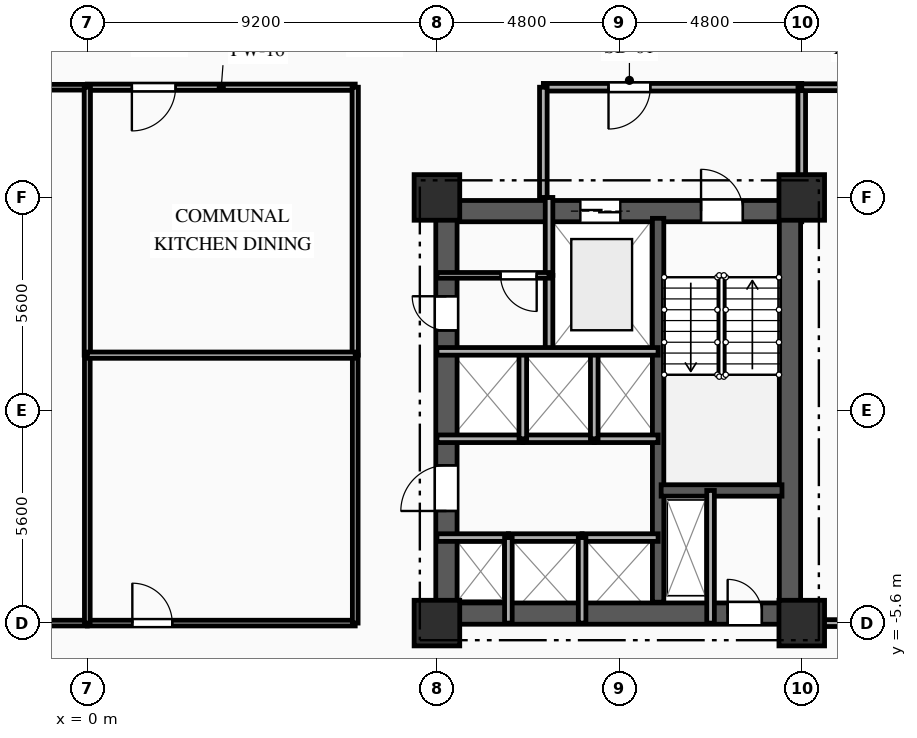
"""IFC4 building model, lengths in metres.
Left out: names, types, materials, properties, quantities, classifications, styles, units other than length and angle.
Written with IfcOpenShell. Run it as: python <this file> out.ifc"""

import sys

from ifc_helpers import new_model, si_unit, direction, frame, frame_2d, origin, origin_2d, place, context, subcontext, project, spatial, rectangle, extrude, element, fill, save


model = new_model("IFC4")
c1 = context("Model", 3, precision=1e-05, world=origin(), true_north=direction((0.0, 1.0)))
c2 = subcontext(c1, "Body", "Model", "MODEL_VIEW")
j1 = project(units=[si_unit("LENGTHUNIT", "METRE"), si_unit("PLANEANGLEUNIT", "RADIAN")], contexts=[c1])
p1 = place(None, origin())
s1 = spatial("IfcSite", under=j1, at=p1, CompositionType="ELEMENT")
p2 = place(p1, origin())
s2 = spatial("IfcBuilding", under=s1, at=p2, CompositionType="ELEMENT")
p3 = place(p2, frame((0.0, 0.0, 30.35)))
s3 = spatial("IfcBuildingStorey", under=s2, at=p3, CompositionType="ELEMENT", Elevation=30.35)
for number, where, z_axis, x_axis in (
    (1, (9.2, -5.6, 0.0), (0.0, 0.0, 1.0), (1.0, 0.0, 0.0)),
    (2, (9.2, 5.6, 0.0), (0.0, 0.0, 1.0), (1.0, 0.0, 0.0)),
    (3, (18.8, -5.6, 0.0), (0.0, 0.0, 1.0), (1.0, 0.0, 0.0)),
    (4, (18.8, 5.6, 0.0), (0.0, 0.0, 1.0), (1.0, 0.0, 0.0)),
):
    element("IfcColumn", number, at=place(p3, frame(where, z_axis=z_axis, x_axis=x_axis)), inside=s3, PredefinedType="COLUMN", context=c2, shape_type="SweptSolid", body=[
        extrude(rectangle(XDim=1.2, YDim=1.2, at=origin_2d()), origin(), (0.0, 0.0, 1.0), 3.35),
    ])
p4 = place(p3, frame((9.2, 5.24, 0.0), z_axis=(0.0, 0.0, 1.0), x_axis=(1.0, 0.0, 0.0)))
e5 = element("IfcWall", 5, at=p4, inside=s3, PredefinedType="SHEAR", context=c2, shape_type="SweptSolid", body=[
    extrude(rectangle(XDim=9.6, YDim=0.56, at=frame_2d((4.8, 0.0))), origin(), (0.0, 0.0, 1.0), 3.035),
])
p5 = place(p4, frame((6.95, 0.0, 0.0)))
e6 = element("IfcOpeningElement", 6, at=p5, cuts=e5, PredefinedType="OPENING", context=c2, shape_type="SweptSolid", body=[
    extrude(rectangle(XDim=1.1, YDim=2.15, at=frame_2d((0.55, 1.075))), frame((0.0, 0.29, 0.0), z_axis=(0.0, -1.0, 0.0), x_axis=(1.0, 0.0, 0.0)), (0.0, 0.0, 1.0), 0.58),
])
p6 = place(p4, frame((3.775, 0.0, 0.0)))
e7 = element("IfcOpeningElement", 7, at=p6, cuts=e5, PredefinedType="OPENING", context=c2, shape_type="SweptSolid", body=[
    extrude(rectangle(XDim=1.05, YDim=2.1, at=frame_2d((0.525, 1.05))), frame((0.0, 0.29, 0.0), z_axis=(0.0, -1.0, 0.0), x_axis=(1.0, 0.0, 0.0)), (0.0, 0.0, 1.0), 0.58),
])
p7 = place(p3, frame((9.2, -5.35, 0.0), z_axis=(0.0, 0.0, 1.0), x_axis=(1.0, 0.0, 0.0)))
e8 = element("IfcWall", 8, at=p7, inside=s3, PredefinedType="SHEAR", context=c2, shape_type="SweptSolid", body=[
    extrude(rectangle(XDim=9.6, YDim=0.56, at=frame_2d((4.8, 0.0))), origin(), (0.0, 0.0, 1.0), 3.035),
])
p8 = place(p7, frame((7.65, 0.0, 0.0)))
e9 = element("IfcOpeningElement", 9, at=p8, cuts=e8, PredefinedType="OPENING", context=c2, shape_type="SweptSolid", body=[
    extrude(rectangle(XDim=0.9, YDim=2.1, at=frame_2d((0.45, 1.05))), frame((0.0, 0.29, 0.0), z_axis=(0.0, -1.0, 0.0), x_axis=(1.0, 0.0, 0.0)), (0.0, 0.0, 1.0), 0.58),
])
p9 = place(p3, frame((9.45, -5.05, 0.0), z_axis=(0.0, 0.0, 1.0), x_axis=(0.0, 1.0, 0.0)))
e10 = element("IfcWall", 10, at=p9, inside=s3, PredefinedType="SHEAR", context=c2, shape_type="SweptSolid", body=[
    extrude(rectangle(XDim=10.1, YDim=0.56, at=frame_2d((5.05, 0.0))), origin(), (0.0, 0.0, 1.0), 3.035),
])
p10 = place(p9, frame((7.15, 0.0, 0.0)))
e11 = element("IfcOpeningElement", 11, at=p10, cuts=e10, PredefinedType="OPENING", context=c2, shape_type="SweptSolid", body=[
    extrude(rectangle(XDim=0.9, YDim=2.1, at=frame_2d((0.45, 1.05))), frame((0.0, 0.29, 0.0), z_axis=(0.0, -1.0, 0.0), x_axis=(1.0, 0.0, 0.0)), (0.0, 0.0, 1.0), 0.58),
])
p11 = place(p9, frame((2.4, 0.0, 0.0)))
e12 = element("IfcOpeningElement", 12, at=p11, cuts=e10, PredefinedType="OPENING", context=c2, shape_type="SweptSolid", body=[
    extrude(rectangle(XDim=1.2, YDim=2.15, at=frame_2d((0.6, 1.075))), frame((0.0, 0.29, 0.0), z_axis=(0.0, -1.0, 0.0), x_axis=(1.0, 0.0, 0.0)), (0.0, 0.0, 1.0), 0.58),
])
p12 = place(p3, frame((18.49, -5.05, 0.0), z_axis=(0.0, 0.0, 1.0), x_axis=(0.0, 1.0, 0.0)))
e13 = element("IfcWall", 13, at=p12, inside=s3, PredefinedType="SHEAR", context=c2, shape_type="SweptSolid", body=[
    extrude(rectangle(XDim=10.1, YDim=0.56, at=frame_2d((5.05, 0.0))), origin(), (0.0, 0.0, 1.0), 3.035),
])
p13 = place(p3, frame((15.02, -5.05, 0.0), z_axis=(0.0, 0.0, 1.0), x_axis=(0.0, 1.0, 0.0)))
e14 = element("IfcWall", 14, at=p13, inside=s3, PredefinedType="SHEAR", context=c2, shape_type="SweptSolid", body=[
    extrude(rectangle(XDim=10.1, YDim=0.3, at=frame_2d((5.05, 0.0))), origin(), (0.0, 0.0, 1.0), 3.035),
])
p14 = place(p3, frame((15.1, -2.11, 0.0), z_axis=(0.0, 0.0, 1.0), x_axis=(1.0, 0.0, 0.0)))
e15 = element("IfcWall", 15, at=p14, inside=s3, PredefinedType="SHEAR", context=c2, shape_type="SweptSolid", body=[
    extrude(rectangle(XDim=3.18, YDim=0.3, at=frame_2d((1.59, 0.0))), origin(), (0.0, 0.0, 1.0), 3.035),
])
p15 = place(p3, frame((16.4, -2.11, 0.0), z_axis=(0.0, 0.0, 1.0), x_axis=(0.0, -1.0, 0.0)))
e16 = element("IfcWall", 16, at=p15, inside=s3, PredefinedType="PARTITIONING", context=c2, shape_type="SweptSolid", body=[
    extrude(rectangle(XDim=3.49, YDim=0.2, at=frame_2d((1.745, 0.0))), origin(), (0.0, 0.0, 1.0), 3.035),
])
p16 = place(p3, frame((12.15, 3.55, 0.0), z_axis=(0.0, 0.0, 1.0), x_axis=(0.0, -1.0, 0.0)))
e17 = element("IfcWall", 17, at=p16, inside=s3, PredefinedType="PARTITIONING", context=c2, shape_type="SweptSolid", body=[
    extrude(rectangle(XDim=2.0, YDim=0.2, at=frame_2d((1.0, 0.0))), origin(), (0.0, 0.0, 1.0), 3.035),
])
p17 = place(p3, frame((12.15, 5.6, 0.0), z_axis=(0.0, 0.0, 1.0), x_axis=(0.0, -1.0, 0.0)))
e18 = element("IfcWall", 18, at=p17, inside=s3, PredefinedType="PARTITIONING", context=c2, shape_type="SweptSolid", body=[
    extrude(rectangle(XDim=2.05, YDim=0.2, at=frame_2d((1.025, 0.0))), origin(), (0.0, 0.0, 1.0), 3.035),
])
p18 = place(p3, frame((18.8, 8.5, 0.0), z_axis=(0.0, 0.0, 1.0), x_axis=(-1.0, 0.0, 0.0)))
e19 = element("IfcWall", 19, at=p18, inside=s3, PredefinedType="PARTITIONING", context=c2, shape_type="SweptSolid", body=[
    extrude(rectangle(XDim=6.8, YDim=0.2, at=frame_2d((3.4, 0.0))), origin(), (0.0, 0.0, 1.0), 3.035),
])
p19 = place(p18, frame((3.985, 0.0, 0.0)))
e20 = element("IfcOpeningElement", 20, at=p19, cuts=e19, PredefinedType="OPENING", context=c2, shape_type="SweptSolid", body=[
    extrude(rectangle(XDim=1.1, YDim=2.15, at=frame_2d((0.55, 1.075))), frame((0.0, 0.11, 0.0), z_axis=(0.0, -1.0, 0.0), x_axis=(1.0, 0.0, 0.0)), (0.0, 0.0, 1.0), 0.22),
])
p20 = place(p3, frame((12.0, 8.5, 0.0), z_axis=(0.0, 0.0, 1.0), x_axis=(0.0, -1.0, 0.0)))
e21 = element("IfcWall", 21, at=p20, inside=s3, PredefinedType="PARTITIONING", context=c2, shape_type="SweptSolid", body=[
    extrude(rectangle(XDim=2.9, YDim=0.2, at=frame_2d((1.45, 0.0))), origin(), (0.0, 0.0, 1.0), 3.035),
])
p21 = place(p3, frame((18.8, 5.6, 0.0), z_axis=(0.0, 0.0, 1.0), x_axis=(0.0, 1.0, 0.0)))
e22 = element("IfcWall", 22, at=p21, inside=s3, PredefinedType="PARTITIONING", context=c2, shape_type="SweptSolid", body=[
    extrude(rectangle(XDim=2.9, YDim=0.2, at=frame_2d((1.45, 0.0))), origin(), (0.0, 0.0, 1.0), 2.52),
])
p22 = place(p3, frame((12.15, 3.55, 0.0), z_axis=(0.0, 0.0, 1.0), x_axis=(-1.0, 0.0, 0.0)))
e23 = element("IfcWall", 23, at=p22, inside=s3, PredefinedType="PARTITIONING", context=c2, shape_type="SweptSolid", body=[
    extrude(rectangle(XDim=2.95, YDim=0.15, at=frame_2d((1.475, 0.0))), origin(), (0.0, 0.0, 1.0), 3.035),
])
p23 = place(p22, frame((0.325, 0.0, 0.0)))
e24 = element("IfcOpeningElement", 24, at=p23, cuts=e23, PredefinedType="OPENING", context=c2, shape_type="SweptSolid", body=[
    extrude(rectangle(XDim=0.95, YDim=2.1, at=frame_2d((0.475, 1.05))), frame((0.0, 0.085, 0.0), z_axis=(0.0, -1.0, 0.0), x_axis=(1.0, 0.0, 0.0)), (0.0, 0.0, 1.0), 0.17),
])
p24 = place(p3, frame((9.2, -3.35, 0.0), z_axis=(0.0, 0.0, 1.0), x_axis=(1.0, 0.0, 0.0)))
e25 = element("IfcWall", 25, at=p24, inside=s3, PredefinedType="PARTITIONING", context=c2, shape_type="SweptSolid", body=[
    extrude(rectangle(XDim=1.88, YDim=0.2, at=frame_2d((0.94, 0.0))), origin(), (0.0, 0.0, 1.0), 2.75),
])
p25 = place(p3, frame((11.08, -3.35, 0.0), z_axis=(0.0, 0.0, 1.0), x_axis=(1.0, 0.0, 0.0)))
e26 = element("IfcWall", 26, at=p25, inside=s3, PredefinedType="PARTITIONING", context=c2, shape_type="SweptSolid", body=[
    extrude(rectangle(XDim=1.94, YDim=0.2, at=frame_2d((0.97, 0.0))), origin(), (0.0, 0.0, 1.0), 3.035),
])
p26 = place(p3, frame((13.02, -3.35, 0.0), z_axis=(0.0, 0.0, 1.0), x_axis=(1.0, 0.0, 0.0)))
e27 = element("IfcWall", 27, at=p26, inside=s3, PredefinedType="PARTITIONING", context=c2, shape_type="SweptSolid", body=[
    extrude(rectangle(XDim=2.0, YDim=0.2, at=frame_2d((1.0, 0.0))), origin(), (0.0, 0.0, 1.0), 3.035),
])
p27 = place(p3, frame((11.46, -0.75, 0.0), z_axis=(0.0, 0.0, 1.0), x_axis=(-1.0, 0.0, 0.0)))
e28 = element("IfcWall", 28, at=p27, inside=s3, PredefinedType="PARTITIONING", context=c2, shape_type="SweptSolid", body=[
    extrude(rectangle(XDim=2.26, YDim=0.2, at=frame_2d((1.13, 0.0))), origin(), (0.0, 0.0, 1.0), 3.035),
])
p28 = place(p3, frame((13.34, -0.75, 0.0), z_axis=(0.0, 0.0, 1.0), x_axis=(-1.0, 0.0, 0.0)))
e29 = element("IfcWall", 29, at=p28, inside=s3, PredefinedType="PARTITIONING", context=c2, shape_type="SweptSolid", body=[
    extrude(rectangle(XDim=1.88, YDim=0.2, at=frame_2d((0.94, 0.0))), origin(), (0.0, 0.0, 1.0), 3.035),
])
p29 = place(p3, frame((15.02, -0.75, 0.0), z_axis=(0.0, 0.0, 1.0), x_axis=(-1.0, 0.0, 0.0)))
e30 = element("IfcWall", 30, at=p29, inside=s3, PredefinedType="PARTITIONING", context=c2, shape_type="SweptSolid", body=[
    extrude(rectangle(XDim=1.68, YDim=0.2, at=frame_2d((0.84, 0.0))), origin(), (0.0, 0.0, 1.0), 3.035),
])
for number, where, z_axis, x_axis in (
    (31, (11.08, -5.6, 0.0), (0.0, 0.0, 1.0), (0.0, 1.0, 0.0)),
    (32, (13.02, -5.6, 0.0), (0.0, 0.0, 1.0), (0.0, 1.0, 0.0)),
):
    element("IfcWall", number, at=place(p3, frame(where, z_axis=z_axis, x_axis=x_axis)), inside=s3, PredefinedType="PARTITIONING", context=c2, shape_type="SweptSolid", body=[
        extrude(rectangle(XDim=2.25, YDim=0.2, at=frame_2d((1.125, 0.0))), origin(), (0.0, 0.0, 1.0), 3.035),
    ])
for number, where, z_axis, x_axis in (
    (33, (11.46, -0.75, 0.0), (0.0, 0.0, 1.0), (0.0, 1.0, 0.0)),
    (34, (13.34, -0.75, 0.0), (0.0, 0.0, 1.0), (0.0, 1.0, 0.0)),
):
    element("IfcWall", number, at=place(p3, frame(where, z_axis=z_axis, x_axis=x_axis)), inside=s3, PredefinedType="PARTITIONING", context=c2, shape_type="SweptSolid", body=[
        extrude(rectangle(XDim=2.3, YDim=0.2, at=frame_2d((1.15, 0.0))), origin(), (0.0, 0.0, 1.0), 3.035),
    ])
p30 = place(p3, frame((0.0, 8.5, 0.0), z_axis=(0.0, 0.0, 1.0), x_axis=(-1.0, 0.0, 0.0)))
e35 = element("IfcWall", 35, at=p30, inside=s3, PredefinedType="PARTITIONING", context=c2, shape_type="SweptSolid", body=[
    extrude(rectangle(XDim=7.05, YDim=0.15, at=frame_2d((3.525, 0.0))), origin(), (0.0, 0.0, 1.0), 3.035),
])
p31 = place(p3, frame((21.45, 8.5, 0.0), z_axis=(0.0, 0.0, 1.0), x_axis=(-1.0, 0.0, 0.0)))
e36 = element("IfcWall", 36, at=p31, inside=s3, PredefinedType="PARTITIONING", context=c2, shape_type="SweptSolid", body=[
    extrude(rectangle(XDim=2.65, YDim=0.18, at=frame_2d((1.325, 0.0))), origin(), (0.0, 0.0, 1.0), 3.035),
])
p32 = place(p31, frame((0.641, 0.0, 0.0)))
e37 = element("IfcOpeningElement", 37, at=p32, cuts=e36, PredefinedType="OPENING", context=c2, shape_type="SweptSolid", body=[
    extrude(rectangle(XDim=1.0, YDim=2.15, at=frame_2d((0.5, 1.075))), frame((0.0, 0.1, 0.0), z_axis=(0.0, -1.0, 0.0), x_axis=(1.0, 0.0, 0.0)), (0.0, 0.0, 1.0), 0.2),
])
p33 = place(p3, frame((7.05, 8.5, 0.0), z_axis=(0.0, 0.0, 1.0), x_axis=(-1.0, 0.0, 0.0)))
e38 = element("IfcWall", 38, at=p33, inside=s3, PredefinedType="PARTITIONING", context=c2, shape_type="SweptSolid", body=[
    extrude(rectangle(XDim=7.05, YDim=0.165, at=frame_2d((3.525, 0.0))), origin(), (0.0, 0.0, 1.0), 3.035),
])
p34 = place(p33, frame((4.728, 0.0, 0.0)))
e39 = element("IfcOpeningElement", 39, at=p34, cuts=e38, PredefinedType="OPENING", context=c2, shape_type="SweptSolid", body=[
    extrude(rectangle(XDim=1.15, YDim=2.15, at=frame_2d((0.575, 1.075))), frame((0.0, 0.093, 0.0), z_axis=(0.0, -1.0, 0.0), x_axis=(1.0, 0.0, 0.0)), (0.0, 0.0, 1.0), 0.185),
])
p35 = place(p3, frame((-7.05, -5.6, 0.0), z_axis=(0.0, 0.0, 1.0), x_axis=(1.0, 0.0, 0.0)))
e40 = element("IfcWall", 40, at=p35, inside=s3, PredefinedType="PARTITIONING", context=c2, shape_type="SweptSolid", body=[
    extrude(rectangle(XDim=7.05, YDim=0.15, at=frame_2d((3.525, 0.0))), origin(), (0.0, 0.0, 1.0), 2.52),
])
p36 = place(p3, frame((18.8, -5.6, 0.0), z_axis=(0.0, 0.0, 1.0), x_axis=(1.0, 0.0, 0.0)))
e41 = element("IfcWall", 41, at=p36, inside=s3, PredefinedType="PARTITIONING", context=c2, shape_type="SweptSolid", body=[
    extrude(rectangle(XDim=2.65, YDim=0.18, at=frame_2d((1.325, 0.0))), origin(), (0.0, 0.0, 1.0), 3.035),
])
p37 = place(p3, frame((0.0, -5.6, 0.0), z_axis=(0.0, 0.0, 1.0), x_axis=(1.0, 0.0, 0.0)))
e42 = element("IfcWall", 42, at=p37, inside=s3, PredefinedType="PARTITIONING", context=c2, shape_type="SweptSolid", body=[
    extrude(rectangle(XDim=7.05, YDim=0.15, at=frame_2d((3.525, 0.0))), origin(), (0.0, 0.0, 1.0), 2.52),
])
p38 = place(p37, frame((1.185, 0.0, 0.0)))
e43 = element("IfcOpeningElement", 43, at=p38, cuts=e42, PredefinedType="OPENING", context=c2, shape_type="SweptSolid", body=[
    extrude(rectangle(XDim=1.05, YDim=2.15, at=frame_2d((0.525, 1.075))), frame((0.0, 0.085, 0.0), z_axis=(0.0, -1.0, 0.0), x_axis=(1.0, 0.0, 0.0)), (0.0, 0.0, 1.0), 0.17),
])
p39 = place(p3, frame((7.05, -5.6, 0.0), z_axis=(0.0, 0.0, 1.0), x_axis=(0.0, 1.0, 0.0)))
e44 = element("IfcWall", 44, at=p39, inside=s3, PredefinedType="PARTITIONING", context=c2, shape_type="SweptSolid", body=[
    extrude(rectangle(XDim=7.05, YDim=0.15, at=frame_2d((3.525, 0.0))), origin(), (0.0, 0.0, 1.0), 3.035),
])
p40 = place(p3, frame((7.05, 1.45, 0.0), z_axis=(0.0, 0.0, 1.0), x_axis=(0.0, 1.0, 0.0)))
e45 = element("IfcWall", 45, at=p40, inside=s3, PredefinedType="PARTITIONING", context=c2, shape_type="SweptSolid", body=[
    extrude(rectangle(XDim=7.05, YDim=0.165, at=frame_2d((3.525, 0.0))), origin(), (0.0, 0.0, 1.0), 3.035),
])
p41 = place(p3, frame((0.0, 1.45, 0.0), z_axis=(0.0, 0.0, 1.0), x_axis=(0.0, -1.0, 0.0)))
e46 = element("IfcWall", 46, at=p41, inside=s3, PredefinedType="PARTITIONING", context=c2, shape_type="SweptSolid", body=[
    extrude(rectangle(XDim=7.05, YDim=0.15, at=frame_2d((3.525, 0.0))), origin(), (0.0, 0.0, 1.0), 3.035),
])
for number, where, z_axis, x_axis in (
    (47, (0.0, 8.5, 0.0), (0.0, 0.0, 1.0), (0.0, -1.0, 0.0)),
    (48, (0.0, 1.45, 0.0), (0.0, 0.0, 1.0), (1.0, 0.0, 0.0)),
):
    element("IfcWall", number, at=place(p3, frame(where, z_axis=z_axis, x_axis=x_axis)), inside=s3, PredefinedType="PARTITIONING", context=c2, shape_type="SweptSolid", body=[
        extrude(rectangle(XDim=7.05, YDim=0.165, at=frame_2d((3.525, 0.0))), origin(), (0.0, 0.0, 1.0), 3.035),
    ])
p42 = place(p3, frame((9.2, 1.55, 0.0), z_axis=(0.0, 0.0, 1.0), x_axis=(1.0, 0.0, 0.0)))
e49 = element("IfcWall", 49, at=p42, inside=s3, PredefinedType="PARTITIONING", context=c2, shape_type="SweptSolid", body=[
    extrude(rectangle(XDim=5.82, YDim=0.2, at=frame_2d((2.91, 0.0))), origin(), (0.0, 0.0, 1.0), 3.035),
])
p43 = place(p5, origin())
e50 = element("IfcDoor", 50, at=p43, inside=s3, OperationType="SINGLE_SWING_LEFT", PredefinedType="DOOR", context=c2, shape_type="SweptSolid", body=[
    extrude(rectangle(XDim=1.1, YDim=2.15, at=frame_2d((0.55, 1.075))), frame((0.0, 0.025, 0.0), z_axis=(0.0, -1.0, 0.0), x_axis=(1.0, 0.0, 0.0)), (0.0, 0.0, 1.0), 0.05),
])
fill(e6, e50)
p44 = place(p6, origin())
e51 = element("IfcDoor", 51, at=p44, inside=s3, OperationType="DOUBLE_DOOR_SLIDING", PredefinedType="DOOR", context=c2, shape_type="SweptSolid", body=[
    extrude(rectangle(XDim=1.05, YDim=2.1, at=frame_2d((0.525, 1.05))), frame((0.0, 0.025, 0.0), z_axis=(0.0, -1.0, 0.0), x_axis=(1.0, 0.0, 0.0)), (0.0, 0.0, 1.0), 0.05),
])
fill(e7, e51)
p45 = place(p8, origin())
e52 = element("IfcDoor", 52, at=p45, inside=s3, OperationType="SINGLE_SWING_LEFT", PredefinedType="DOOR", context=c2, shape_type="SweptSolid", body=[
    extrude(rectangle(XDim=0.9, YDim=2.1, at=frame_2d((0.45, 1.05))), frame((0.0, 0.025, 0.0), z_axis=(0.0, -1.0, 0.0), x_axis=(1.0, 0.0, 0.0)), (0.0, 0.0, 1.0), 0.05),
])
fill(e9, e52)
p46 = place(p19, origin())
e53 = element("IfcDoor", 53, at=p46, inside=s3, OperationType="SINGLE_SWING_RIGHT", PredefinedType="DOOR", context=c2, shape_type="SweptSolid", body=[
    extrude(rectangle(XDim=1.1, YDim=2.15, at=frame_2d((0.55, 1.075))), frame((0.0, 0.025, 0.0), z_axis=(0.0, -1.0, 0.0), x_axis=(1.0, 0.0, 0.0)), (0.0, 0.0, 1.0), 0.05),
])
fill(e20, e53)
p47 = place(p23, origin())
e54 = element("IfcDoor", 54, at=p47, inside=s3, OperationType="SINGLE_SWING_LEFT", PredefinedType="DOOR", context=c2, shape_type="SweptSolid", body=[
    extrude(rectangle(XDim=0.95, YDim=2.1, at=frame_2d((0.475, 1.05))), frame((0.0, 0.025, 0.0), z_axis=(0.0, -1.0, 0.0), x_axis=(1.0, 0.0, 0.0)), (0.0, 0.0, 1.0), 0.05),
])
fill(e24, e54)
p48 = place(p10, origin())
e55 = element("IfcDoor", 55, at=p48, inside=s3, OperationType="SINGLE_SWING_RIGHT", PredefinedType="DOOR", context=c2, shape_type="SweptSolid", body=[
    extrude(rectangle(XDim=0.9, YDim=2.1, at=frame_2d((0.45, 1.05))), frame((0.0, 0.025, 0.0), z_axis=(0.0, -1.0, 0.0), x_axis=(1.0, 0.0, 0.0)), (0.0, 0.0, 1.0), 0.05),
])
fill(e11, e55)
p49 = place(p11, origin())
e56 = element("IfcDoor", 56, at=p49, inside=s3, OperationType="SINGLE_SWING_LEFT", PredefinedType="DOOR", context=c2, shape_type="SweptSolid", body=[
    extrude(rectangle(XDim=1.2, YDim=2.15, at=frame_2d((0.6, 1.075))), frame((0.0, 0.025, 0.0), z_axis=(0.0, -1.0, 0.0), x_axis=(1.0, 0.0, 0.0)), (0.0, 0.0, 1.0), 0.05),
])
fill(e12, e56)
p50 = place(p34, origin())
e57 = element("IfcDoor", 57, at=p50, inside=s3, OperationType="SINGLE_SWING_RIGHT", PredefinedType="DOOR", context=c2, shape_type="SweptSolid", body=[
    extrude(rectangle(XDim=1.15, YDim=2.15, at=frame_2d((0.575, 1.075))), frame((0.0, 0.025, 0.0), z_axis=(0.0, -1.0, 0.0), x_axis=(1.0, 0.0, 0.0)), (0.0, 0.0, 1.0), 0.05),
])
fill(e39, e57)
p51 = place(p38, origin())
e58 = element("IfcDoor", 58, at=p51, inside=s3, OperationType="SINGLE_SWING_LEFT", PredefinedType="DOOR", context=c2, shape_type="SweptSolid", body=[
    extrude(rectangle(XDim=1.05, YDim=2.15, at=frame_2d((0.525, 1.075))), frame((0.0, 0.025, 0.0), z_axis=(0.0, -1.0, 0.0), x_axis=(1.0, 0.0, 0.0)), (0.0, 0.0, 1.0), 0.05),
])
fill(e43, e58)
save(model, sys.argv[1])
